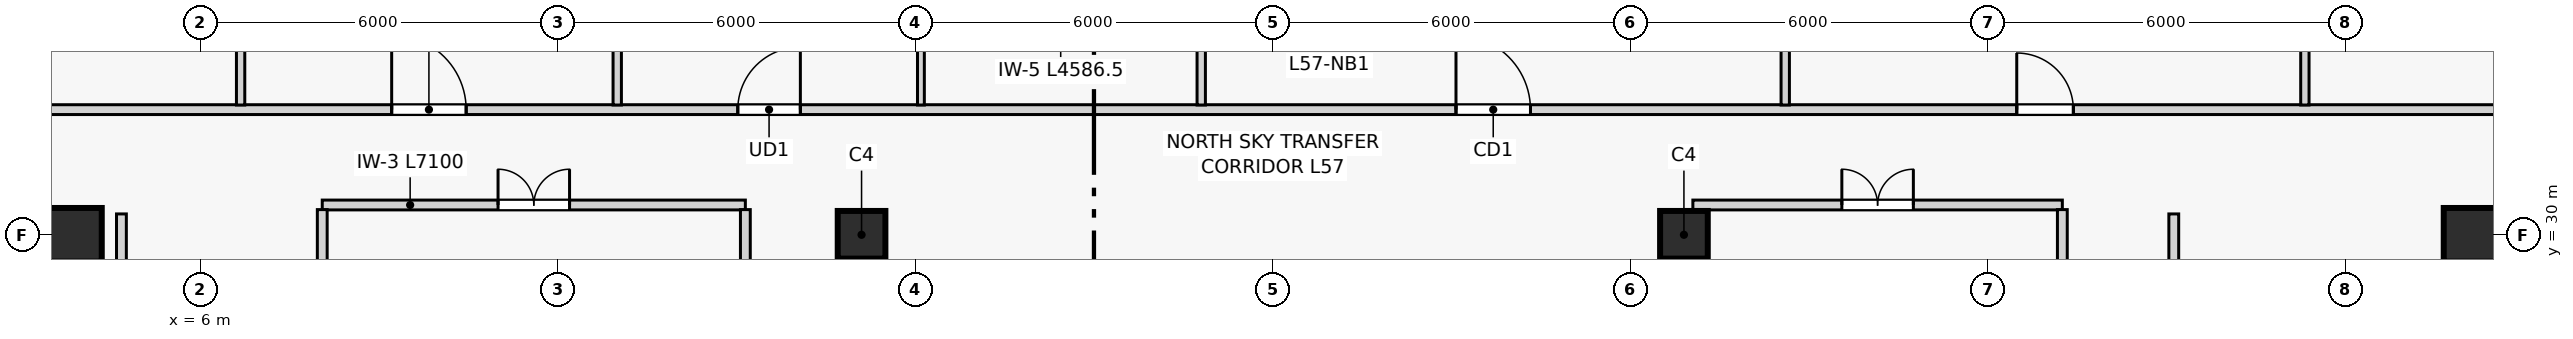
"""IFC4 building model, lengths in metres.
Left out: names, types, materials, properties, quantities, classifications, styles, units other than length and angle.
Written with IfcOpenShell. Run it as: python <this file> out.ifc"""

import sys

from ifc_helpers import new_model, si_unit, direction, frame, frame_2d, origin, origin_2d, place, context, subcontext, project, spatial, rectangle, extrude, source, transform, mapped, element, fill, save


model = new_model("IFC4")
c1 = context("Model", 3, precision=1e-05, world=origin(), true_north=direction((0.0, 1.0)))
c2 = subcontext(c1, "Body", "Model", "MODEL_VIEW")
j1 = project(units=[si_unit("LENGTHUNIT", "METRE"), si_unit("PLANEANGLEUNIT", "RADIAN")], contexts=[c1])
p1 = place(None, origin())
s1 = spatial("IfcSite", under=j1, at=p1, CompositionType="ELEMENT")
p2 = place(p1, origin())
s2 = spatial("IfcBuilding", under=s1, at=p2, CompositionType="ELEMENT")
p3 = place(p2, frame((0.0, 0.0, 216.9)))
s3 = spatial("IfcBuildingStorey", under=s2, at=p3, CompositionType="ELEMENT", Elevation=216.9)
m1 = source(origin(), c2, "Body", "SweptSolid", [
    extrude(rectangle(XDim=0.9, YDim=0.9, at=origin_2d()), origin(), (0.0, 0.0, 1.0), 3.6),
])
for number, where, z_axis, x_axis in (
    (1, (3.9, 30.0, 0.0), (0.0, 0.0, 1.0), (1.0, 0.0, 0.0)),
    (2, (44.1, 30.0, 0.0), (0.0, 0.0, 1.0), (1.0, 0.0, 0.0)),
):
    element("IfcColumn", number, at=place(p3, frame(where, z_axis=z_axis, x_axis=x_axis)), inside=s3, PredefinedType="COLUMN", context=c2, shape_type="MappedRepresentation", body=[
        mapped(m1, transform((0.0, 0.0, 0.0), scale=1.0)),
    ])
m2 = source(origin(), c2, "Body", "SweptSolid", [
    extrude(rectangle(XDim=0.8, YDim=0.8, at=origin_2d()), origin(), (0.0, 0.0, 1.0), 3.6),
])
for number, where, z_axis, x_axis in (
    (3, (17.1, 30.0, 0.0), (0.0, 0.0, 1.0), (1.0, 0.0, 0.0)),
    (4, (30.9, 30.0, 0.0), (0.0, 0.0, 1.0), (1.0, 0.0, 0.0)),
):
    element("IfcColumn", number, at=place(p3, frame(where, z_axis=z_axis, x_axis=x_axis)), inside=s3, PredefinedType="COLUMN", context=c2, shape_type="MappedRepresentation", body=[
        mapped(m2, transform((0.0, 0.0, 0.0), scale=1.0)),
    ])
p4 = place(p3, frame((8.05, 30.5, 0.0), z_axis=(0.0, 0.0, 1.0), x_axis=(1.0, 0.0, 0.0)))
e5 = element("IfcWall", 5, at=p4, inside=s3, PredefinedType="PARTITIONING", context=c2, shape_type="SweptSolid", body=[
    extrude(rectangle(XDim=7.1, YDim=0.165, at=frame_2d((3.55, 0.0))), origin(), (0.0, 0.0, 1.0), 3.28),
])
p5 = place(p4, frame((2.95, 0.0, 0.0)))
e6 = element("IfcOpeningElement", 6, at=p5, cuts=e5, PredefinedType="OPENING", context=c2, shape_type="SweptSolid", body=[
    extrude(rectangle(XDim=1.2, YDim=2.2, at=frame_2d((0.6, 1.1))), frame((0.0, 0.093, 0.0), z_axis=(0.0, -1.0, 0.0), x_axis=(1.0, 0.0, 0.0)), (0.0, 0.0, 1.0), 0.185),
])
for number, where, z_axis, x_axis in (
    (7, (8.05, 27.37, 0.0), (0.0, 0.0, 1.0), (0.0, 1.0, 0.0)),
    (8, (15.15, 27.37, 0.0), (0.0, 0.0, 1.0), (0.0, 1.0, 0.0)),
):
    element("IfcWall", number, at=place(p3, frame(where, z_axis=z_axis, x_axis=x_axis)), inside=s3, PredefinedType="PARTITIONING", context=c2, shape_type="SweptSolid", body=[
        extrude(rectangle(XDim=3.052, YDim=0.165, at=frame_2d((1.526, 0.0))), origin(), (0.0, 0.0, 1.0), 3.28),
    ])
p6 = place(p3, frame((31.05, 30.5, 0.0), z_axis=(0.0, 0.0, 1.0), x_axis=(1.0, 0.0, 0.0)))
e9 = element("IfcWall", 9, at=p6, inside=s3, PredefinedType="PARTITIONING", context=c2, shape_type="SweptSolid", body=[
    extrude(rectangle(XDim=6.2, YDim=0.165, at=frame_2d((3.1, 0.0))), origin(), (0.0, 0.0, 1.0), 3.28),
])
p7 = place(p6, frame((2.5, 0.0, 0.0)))
e10 = element("IfcOpeningElement", 10, at=p7, cuts=e9, PredefinedType="OPENING", context=c2, shape_type="SweptSolid", body=[
    extrude(rectangle(XDim=1.2, YDim=2.2, at=frame_2d((0.6, 1.1))), frame((0.0, 0.093, 0.0), z_axis=(0.0, -1.0, 0.0), x_axis=(1.0, 0.0, 0.0)), (0.0, 0.0, 1.0), 0.185),
])
p8 = place(p3, frame((31.05, 27.37, 0.0), z_axis=(0.0, 0.0, 1.0), x_axis=(0.0, 1.0, 0.0)))
e11 = element("IfcWall", 11, at=p8, inside=s3, PredefinedType="PARTITIONING", context=c2, shape_type="SweptSolid", body=[
    extrude(rectangle(XDim=3.052, YDim=0.165, at=frame_2d((1.526, 0.0))), origin(), (0.0, 0.0, 1.0), 2.821),
])
p9 = place(p3, frame((37.25, 27.37, 0.0), z_axis=(0.0, 0.0, 1.0), x_axis=(0.0, 1.0, 0.0)))
e12 = element("IfcWall", 12, at=p9, inside=s3, PredefinedType="PARTITIONING", context=c2, shape_type="SweptSolid", body=[
    extrude(rectangle(XDim=3.052, YDim=0.165, at=frame_2d((1.526, 0.0))), origin(), (0.0, 0.0, 1.0), 3.28),
])
p10 = place(p3, frame((3.145, 32.1, 0.0), z_axis=(0.0, 0.0, 1.0), x_axis=(1.0, 0.0, 0.0)))
e13 = element("IfcWall", 13, at=p10, inside=s3, PredefinedType="PARTITIONING", context=c2, shape_type="SweptSolid", body=[
    extrude(rectangle(XDim=41.71, YDim=0.165, at=frame_2d((20.855, 0.0))), origin(), (0.0, 0.0, 1.0), 3.28),
])
p11 = place(p10, frame((6.07, 0.0, 0.0)))
e14 = element("IfcOpeningElement", 14, at=p11, cuts=e13, PredefinedType="OPENING", context=c2, shape_type="SweptSolid", body=[
    extrude(rectangle(XDim=1.25, YDim=2.2, at=frame_2d((0.625, 1.1))), frame((0.0, 0.093, 0.0), z_axis=(0.0, -1.0, 0.0), x_axis=(1.0, 0.0, 0.0)), (0.0, 0.0, 1.0), 0.185),
])
p12 = place(p10, frame((11.878, 0.0, 0.0)))
e15 = element("IfcOpeningElement", 15, at=p12, cuts=e13, PredefinedType="OPENING", context=c2, shape_type="SweptSolid", body=[
    extrude(rectangle(XDim=1.05, YDim=2.15, at=frame_2d((0.525, 1.075))), frame((0.0, 0.093, 0.0), z_axis=(0.0, -1.0, 0.0), x_axis=(1.0, 0.0, 0.0)), (0.0, 0.0, 1.0), 0.185),
])
p13 = place(p10, frame((23.93, 0.0, 0.0)))
e16 = element("IfcOpeningElement", 16, at=p13, cuts=e13, PredefinedType="OPENING", context=c2, shape_type="SweptSolid", body=[
    extrude(rectangle(XDim=1.25, YDim=2.2, at=frame_2d((0.625, 1.1))), frame((0.0, 0.093, 0.0), z_axis=(0.0, -1.0, 0.0), x_axis=(1.0, 0.0, 0.0)), (0.0, 0.0, 1.0), 0.185),
])
p14 = place(p10, frame((33.34, 0.0, 0.0)))
e17 = element("IfcOpeningElement", 17, at=p14, cuts=e13, PredefinedType="OPENING", context=c2, shape_type="SweptSolid", body=[
    extrude(rectangle(XDim=0.95, YDim=2.1, at=frame_2d((0.475, 1.05))), frame((0.0, 0.093, 0.0), z_axis=(0.0, -1.0, 0.0), x_axis=(1.0, 0.0, 0.0)), (0.0, 0.0, 1.0), 0.185),
])
p15 = place(p3, frame((4.68, 26.45, 0.0), z_axis=(0.0, 0.0, 1.0), x_axis=(0.0, 1.0, 0.0)))
e18 = element("IfcWall", 18, at=p15, inside=s3, PredefinedType="PARTITIONING", context=c2, shape_type="SweptSolid", body=[
    extrude(rectangle(XDim=3.9, YDim=0.165, at=frame_2d((1.95, 0.0))), origin(), (0.0, 0.0, 1.0), 3.28),
])
p16 = place(p15, frame((1.475, 0.0, 0.0)))
e19 = element("IfcOpeningElement", 19, at=p16, cuts=e18, PredefinedType="OPENING", context=c2, shape_type="SweptSolid", body=[
    extrude(rectangle(XDim=0.95, YDim=2.1, at=frame_2d((0.475, 1.05))), frame((0.0, 0.093, 0.0), z_axis=(0.0, -1.0, 0.0), x_axis=(1.0, 0.0, 0.0)), (0.0, 0.0, 1.0), 0.185),
])
p17 = place(p3, frame((39.12, 11.45, 0.0), z_axis=(0.0, 0.0, 1.0), x_axis=(0.0, 1.0, 0.0)))
e20 = element("IfcWall", 20, at=p17, inside=s3, PredefinedType="PARTITIONING", context=c2, shape_type="SweptSolid", body=[
    extrude(rectangle(XDim=18.9, YDim=0.165, at=frame_2d((9.45, 0.0))), origin(), (0.0, 0.0, 1.0), 3.28),
])
p18 = place(p17, frame((2.05, 0.0, 0.0)))
e21 = element("IfcOpeningElement", 21, at=p18, cuts=e20, PredefinedType="OPENING", context=c2, shape_type="SweptSolid", body=[
    extrude(rectangle(XDim=0.95, YDim=2.1, at=frame_2d((0.475, 1.05))), frame((0.0, 0.093, 0.0), z_axis=(0.0, -1.0, 0.0), x_axis=(1.0, 0.0, 0.0)), (0.0, 0.0, 1.0), 0.185),
])
p19 = place(p3, frame((6.68, 32.177, 0.0), z_axis=(0.0, 0.0, 1.0), x_axis=(0.0, 1.0, 0.0)))
e22 = element("IfcWall", 22, at=p19, inside=s3, PredefinedType="PARTITIONING", context=c2, shape_type="SweptSolid", body=[
    extrude(rectangle(XDim=7.877, YDim=0.14, at=frame_2d((3.939, 0.0))), origin(), (0.0, 0.0, 1.0), 3.28),
])
for number, where, z_axis, x_axis in (
    (23, (13.0, 32.177, 0.0), (0.0, 0.0, 1.0), (0.0, 1.0, 0.0)),
    (24, (22.8, 32.177, 0.0), (0.0, 0.0, 1.0), (0.0, 1.0, 0.0)),
    (25, (32.6, 32.177, 0.0), (0.0, 0.0, 1.0), (0.0, 1.0, 0.0)),
):
    element("IfcWall", number, at=place(p3, frame(where, z_axis=z_axis, x_axis=x_axis)), inside=s3, PredefinedType="PARTITIONING", context=c2, shape_type="SweptSolid", body=[
        extrude(rectangle(XDim=9.677, YDim=0.14, at=frame_2d((4.839, 0.0))), origin(), (0.0, 0.0, 1.0), 3.28),
    ])
p20 = place(p3, frame((41.32, 32.177, 0.0), z_axis=(0.0, 0.0, 1.0), x_axis=(0.0, 1.0, 0.0)))
e26 = element("IfcWall", 26, at=p20, inside=s3, PredefinedType="PARTITIONING", context=c2, shape_type="SweptSolid", body=[
    extrude(rectangle(XDim=7.877, YDim=0.14, at=frame_2d((3.939, 0.0))), origin(), (0.0, 0.0, 1.0), 3.28),
])
p21 = place(p3, frame((18.096, 32.177, 0.0), z_axis=(0.0, 0.0, 1.0), x_axis=(0.0, 1.0, 0.0)))
e27 = element("IfcWall", 27, at=p21, inside=s3, PredefinedType="PARTITIONING", context=c2, shape_type="SweptSolid", body=[
    extrude(rectangle(XDim=9.677, YDim=0.115, at=frame_2d((4.839, 0.0))), origin(), (0.0, 0.0, 1.0), 3.28),
])
p22 = place(p21, frame((6.895, 0.0, 0.0)))
e28 = element("IfcOpeningElement", 28, at=p22, cuts=e27, PredefinedType="OPENING", context=c2, shape_type="SweptSolid", body=[
    extrude(rectangle(XDim=0.95, YDim=2.1, at=frame_2d((0.475, 1.05))), frame((0.0, 0.067, 0.0), z_axis=(0.0, -1.0, 0.0), x_axis=(1.0, 0.0, 0.0)), (0.0, 0.0, 1.0), 0.135),
])
p23 = place(p21, frame((3.631, 0.0, 0.0)))
e29 = element("IfcOpeningElement", 29, at=p23, cuts=e27, PredefinedType="OPENING", context=c2, shape_type="SweptSolid", body=[
    extrude(rectangle(XDim=0.9, YDim=2.1, at=frame_2d((0.45, 1.05))), frame((0.0, 0.067, 0.0), z_axis=(0.0, -1.0, 0.0), x_axis=(1.0, 0.0, 0.0)), (0.0, 0.0, 1.0), 0.135),
])
p24 = place(p21, frame((0.973, 0.0, 0.0)))
e30 = element("IfcOpeningElement", 30, at=p24, cuts=e27, PredefinedType="OPENING", context=c2, shape_type="SweptSolid", body=[
    extrude(rectangle(XDim=0.9, YDim=2.1, at=frame_2d((0.45, 1.05))), frame((0.0, 0.067, 0.0), z_axis=(0.0, -1.0, 0.0), x_axis=(1.0, 0.0, 0.0)), (0.0, 0.0, 1.0), 0.135),
])
m3 = source(origin(), c2, "Body", "SweptSolid", [
    extrude(rectangle(XDim=1.2, YDim=2.2, at=frame_2d((0.6, 1.1))), frame((0.0, 0.025, 0.0), z_axis=(0.0, -1.0, 0.0), x_axis=(1.0, 0.0, 0.0)), (0.0, 0.0, 1.0), 0.05),
])
p25 = place(p5, origin())
e31 = element("IfcDoor", 31, at=p25, inside=s3, OperationType="DOUBLE_DOOR_SINGLE_SWING", PredefinedType="DOOR", context=c2, shape_type="MappedRepresentation", body=[
    mapped(m3, transform((0.0, 0.0, 0.0), scale=1.0)),
])
fill(e6, e31)
p26 = place(p7, origin())
e32 = element("IfcDoor", 32, at=p26, inside=s3, OperationType="DOUBLE_DOOR_SINGLE_SWING", PredefinedType="DOOR", context=c2, shape_type="MappedRepresentation", body=[
    mapped(m3, transform((0.0, 0.0, 0.0), scale=1.0)),
])
fill(e10, e32)
m4 = source(origin(), c2, "Body", "SweptSolid", [
    extrude(rectangle(XDim=1.25, YDim=2.2, at=frame_2d((0.625, 1.1))), frame((0.0, 0.025, 0.0), z_axis=(0.0, -1.0, 0.0), x_axis=(1.0, 0.0, 0.0)), (0.0, 0.0, 1.0), 0.05),
])
p27 = place(p11, origin())
e33 = element("IfcDoor", 33, at=p27, inside=s3, OperationType="SINGLE_SWING_LEFT", PredefinedType="DOOR", context=c2, shape_type="MappedRepresentation", body=[
    mapped(m4, transform((0.0, 0.0, 0.0), scale=1.0)),
])
fill(e14, e33)
m5 = source(origin(), c2, "Body", "SweptSolid", [
    extrude(rectangle(XDim=1.05, YDim=2.15, at=frame_2d((0.525, 1.075))), frame((0.0, 0.025, 0.0), z_axis=(0.0, -1.0, 0.0), x_axis=(1.0, 0.0, 0.0)), (0.0, 0.0, 1.0), 0.05),
])
p28 = place(p12, origin())
e34 = element("IfcDoor", 34, at=p28, inside=s3, OperationType="SINGLE_SWING_RIGHT", PredefinedType="DOOR", context=c2, shape_type="MappedRepresentation", body=[
    mapped(m5, transform((0.0, 0.0, 0.0), scale=1.0)),
])
fill(e15, e34)
p29 = place(p13, origin())
e35 = element("IfcDoor", 35, at=p29, inside=s3, OperationType="SINGLE_SWING_LEFT", PredefinedType="DOOR", context=c2, shape_type="MappedRepresentation", body=[
    mapped(m4, transform((0.0, 0.0, 0.0), scale=1.0)),
])
fill(e16, e35)
m6 = source(origin(), c2, "Body", "SweptSolid", [
    extrude(rectangle(XDim=0.95, YDim=2.1, at=frame_2d((0.475, 1.05))), frame((0.0, 0.025, 0.0), z_axis=(0.0, -1.0, 0.0), x_axis=(1.0, 0.0, 0.0)), (0.0, 0.0, 1.0), 0.05),
])
p30 = place(p14, origin())
e36 = element("IfcDoor", 36, at=p30, inside=s3, OperationType="SINGLE_SWING_LEFT", PredefinedType="DOOR", context=c2, shape_type="MappedRepresentation", body=[
    mapped(m6, transform((0.0, 0.0, 0.0), scale=1.0)),
])
fill(e17, e36)
save(model, sys.argv[1])
